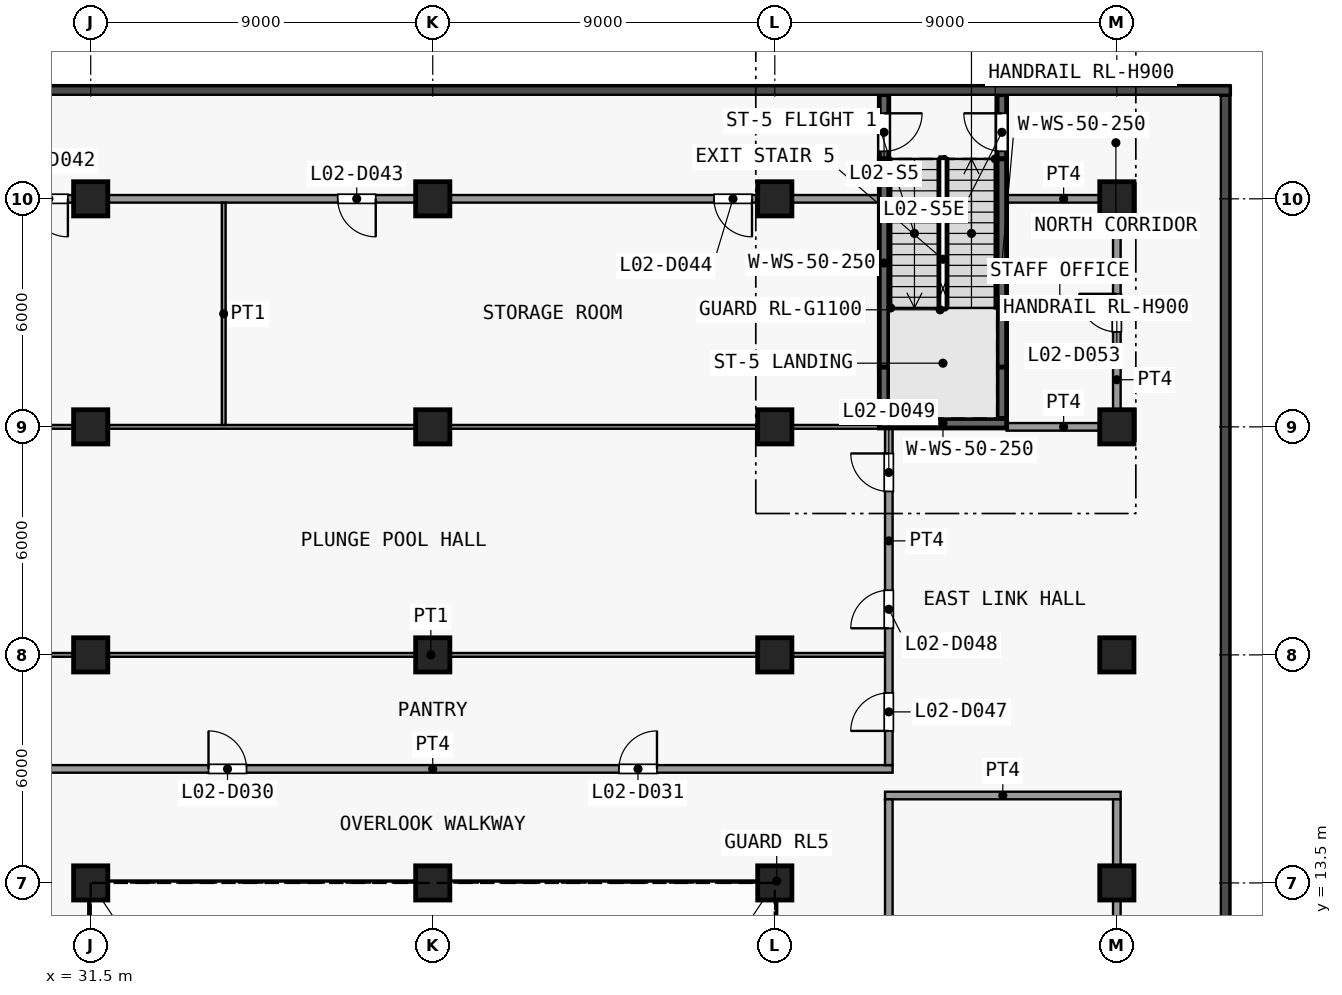
"""IFC4 building model, lengths in metres.
Left out: names, types, materials, properties, quantities, classifications, styles, units other than length and angle.
Written with IfcOpenShell. Run it as: python <this file> out.ifc"""

import sys

from ifc_helpers import new_model, si_unit, direction, frame, frame_2d, origin, origin_2d, place, context, subcontext, project, spatial, rectangle, extrude, element, fill, save


model = new_model("IFC4")
c1 = context("Model", 3, precision=1e-05, world=origin(), true_north=direction((0.0, 1.0)))
c2 = subcontext(c1, "Body", "Model", "MODEL_VIEW")
j1 = project(units=[si_unit("LENGTHUNIT", "METRE"), si_unit("PLANEANGLEUNIT", "RADIAN")], contexts=[c1])
p1 = place(None, origin())
s1 = spatial("IfcSite", under=j1, at=p1, CompositionType="ELEMENT")
p2 = place(p1, origin())
s2 = spatial("IfcBuilding", under=s1, at=p2, CompositionType="ELEMENT")
p3 = place(p2, frame((0.0, 0.0, 13.5)))
s3 = spatial("IfcBuildingStorey", under=s2, at=p3, CompositionType="ELEMENT", Elevation=13.5)
for number, where, z_axis, x_axis in (
    (1, (31.5, 13.5, 0.0), (0.0, 0.0, 1.0), (1.0, 0.0, 0.0)),
    (2, (31.5, 19.5, 0.0), (0.0, 0.0, 1.0), (1.0, 0.0, 0.0)),
    (3, (31.5, 25.5, 0.0), (0.0, 0.0, 1.0), (1.0, 0.0, 0.0)),
    (4, (31.5, 31.5, 0.0), (0.0, 0.0, 1.0), (1.0, 0.0, 0.0)),
    (5, (40.5, 13.5, 0.0), (0.0, 0.0, 1.0), (1.0, 0.0, 0.0)),
    (6, (40.5, 19.5, 0.0), (0.0, 0.0, 1.0), (1.0, 0.0, 0.0)),
    (7, (40.5, 25.5, 0.0), (0.0, 0.0, 1.0), (1.0, 0.0, 0.0)),
    (8, (40.5, 31.5, 0.0), (0.0, 0.0, 1.0), (1.0, 0.0, 0.0)),
    (9, (49.5, 13.5, 0.0), (0.0, 0.0, 1.0), (1.0, 0.0, 0.0)),
    (10, (49.5, 19.5, 0.0), (0.0, 0.0, 1.0), (1.0, 0.0, 0.0)),
    (11, (49.5, 25.5, 0.0), (0.0, 0.0, 1.0), (1.0, 0.0, 0.0)),
    (12, (49.5, 31.5, 0.0), (0.0, 0.0, 1.0), (1.0, 0.0, 0.0)),
    (13, (58.5, 13.5, 0.0), (0.0, 0.0, 1.0), (1.0, 0.0, 0.0)),
    (14, (58.5, 19.5, 0.0), (0.0, 0.0, 1.0), (1.0, 0.0, 0.0)),
    (15, (58.5, 25.5, 0.0), (0.0, 0.0, 1.0), (1.0, 0.0, 0.0)),
    (16, (58.5, 31.5, 0.0), (0.0, 0.0, 1.0), (1.0, 0.0, 0.0)),
):
    element("IfcColumn", number, at=place(p3, frame(where, z_axis=z_axis, x_axis=x_axis)), inside=s3, PredefinedType="COLUMN", context=c2, shape_type="SweptSolid", body=[
        extrude(rectangle(XDim=0.9, YDim=0.9, at=origin_2d()), origin(), (0.0, 0.0, 1.0), 5.0),
    ])
p4 = place(p3, frame((52.375, 34.24, 0.0), z_axis=(0.0, 0.0, 1.0), x_axis=(0.0, -1.0, 0.0)))
e17 = element("IfcWall", 17, at=p4, inside=s3, PredefinedType="SHEAR", context=c2, shape_type="SweptSolid", body=[
    extrude(rectangle(XDim=1.69, YDim=0.25, at=frame_2d((0.845, 0.0))), origin(), (0.0, 0.0, 1.0), 4.65),
])
p5 = place(p4, frame((0.49, 0.0, 0.0)))
e18 = element("IfcOpeningElement", 18, at=p5, cuts=e17, PredefinedType="OPENING", context=c2, shape_type="SweptSolid", body=[
    extrude(rectangle(XDim=1.0, YDim=2.1, at=frame_2d((0.5, 1.05))), frame((0.0, 0.135, 0.0), z_axis=(0.0, -1.0, 0.0), x_axis=(1.0, 0.0, 0.0)), (0.0, 0.0, 1.0), 0.27),
])
p6 = place(p3, frame((52.375, 27.07, 0.0), z_axis=(0.0, 0.0, 1.0), x_axis=(0.0, 1.0, 0.0)))
e19 = element("IfcWall", 19, at=p6, inside=s3, PredefinedType="SHEAR", context=c2, shape_type="SweptSolid", body=[
    extrude(rectangle(XDim=5.48, YDim=0.25, at=frame_2d((2.74, 0.0))), origin(), (0.0, 0.0, 1.0), 4.65),
])
p7 = place(p3, frame((52.375, 25.72, 0.0), z_axis=(0.0, 0.0, 1.0), x_axis=(0.0, 1.0, 0.0)))
e20 = element("IfcWall", 20, at=p7, inside=s3, PredefinedType="SHEAR", context=c2, shape_type="SweptSolid", body=[
    extrude(rectangle(XDim=1.35, YDim=0.25, at=frame_2d((0.675, 0.0))), origin(), (0.0, 0.0, 1.0), 4.65),
])
p8 = place(p3, frame((55.475, 32.55, 0.0), z_axis=(0.0, 0.0, 1.0), x_axis=(0.0, 1.0, 0.0)))
e21 = element("IfcWall", 21, at=p8, inside=s3, PredefinedType="SHEAR", context=c2, shape_type="SweptSolid", body=[
    extrude(rectangle(XDim=1.69, YDim=0.25, at=frame_2d((0.845, 0.0))), origin(), (0.0, 0.0, 1.0), 4.65),
])
p9 = place(p8, frame((0.2, 0.0, 0.0)))
e22 = element("IfcOpeningElement", 22, at=p9, cuts=e21, PredefinedType="OPENING", context=c2, shape_type="SweptSolid", body=[
    extrude(rectangle(XDim=1.0, YDim=2.1, at=frame_2d((0.5, 1.05))), frame((0.0, 0.135, 0.0), z_axis=(0.0, -1.0, 0.0), x_axis=(1.0, 0.0, 0.0)), (0.0, 0.0, 1.0), 0.27),
])
p10 = place(p3, frame((55.475, 27.07, 0.0), z_axis=(0.0, 0.0, 1.0), x_axis=(0.0, 1.0, 0.0)))
e23 = element("IfcWall", 23, at=p10, inside=s3, PredefinedType="SHEAR", context=c2, shape_type="SweptSolid", body=[
    extrude(rectangle(XDim=5.48, YDim=0.25, at=frame_2d((2.74, 0.0))), origin(), (0.0, 0.0, 1.0), 4.65),
])
p11 = place(p3, frame((55.475, 25.72, 0.0), z_axis=(0.0, 0.0, 1.0), x_axis=(0.0, 1.0, 0.0)))
e24 = element("IfcWall", 24, at=p11, inside=s3, PredefinedType="SHEAR", context=c2, shape_type="SweptSolid", body=[
    extrude(rectangle(XDim=1.35, YDim=0.25, at=frame_2d((0.675, 0.0))), origin(), (0.0, 0.0, 1.0), 4.65),
])
p12 = place(p3, frame((52.25, 25.595, 0.0), z_axis=(0.0, 0.0, 1.0), x_axis=(1.0, 0.0, 0.0)))
e25 = element("IfcWall", 25, at=p12, inside=s3, PredefinedType="SHEAR", context=c2, shape_type="SweptSolid", body=[
    extrude(rectangle(XDim=3.35, YDim=0.25, at=frame_2d((1.675, 0.0))), origin(), (0.0, 0.0, 1.0), 4.65),
])
p13 = place(p3, frame((52.4, 15.8, 0.0), z_axis=(0.0, 0.0, 1.0), x_axis=(1.0, 0.0, 0.0)))
e26 = element("IfcWall", 26, at=p13, inside=s3, PredefinedType="PARTITIONING", context=c2, shape_type="SweptSolid", body=[
    extrude(rectangle(XDim=6.2, YDim=0.2, at=frame_2d((3.1, 0.0))), origin(), (0.0, 0.0, 1.0), 4.65),
])
p14 = place(p3, frame((28.4, 16.5, 0.0), z_axis=(0.0, 0.0, 1.0), x_axis=(1.0, 0.0, 0.0)))
e27 = element("IfcWall", 27, at=p14, inside=s3, PredefinedType="PARTITIONING", context=c2, shape_type="SweptSolid", body=[
    extrude(rectangle(XDim=24.2, YDim=0.2, at=frame_2d((12.1, 0.0))), origin(), (0.0, 0.0, 1.0), 4.65),
])
p15 = place(p14, frame((6.2, 0.0, 0.0)))
e28 = element("IfcOpeningElement", 28, at=p15, cuts=e27, PredefinedType="OPENING", context=c2, shape_type="SweptSolid", body=[
    extrude(rectangle(XDim=1.0, YDim=2.1, at=frame_2d((0.5, 1.05))), frame((0.0, 0.11, 0.0), z_axis=(0.0, -1.0, 0.0), x_axis=(1.0, 0.0, 0.0)), (0.0, 0.0, 1.0), 0.22),
])
p16 = place(p14, frame((17.0, 0.0, 0.0)))
e29 = element("IfcOpeningElement", 29, at=p16, cuts=e27, PredefinedType="OPENING", context=c2, shape_type="SweptSolid", body=[
    extrude(rectangle(XDim=1.0, YDim=2.1, at=frame_2d((0.5, 1.05))), frame((0.0, 0.11, 0.0), z_axis=(0.0, -1.0, 0.0), x_axis=(1.0, 0.0, 0.0)), (0.0, 0.0, 1.0), 0.22),
])
p17 = place(p3, frame((28.5, 19.5, 0.0), z_axis=(0.0, 0.0, 1.0), x_axis=(1.0, 0.0, 0.0)))
e30 = element("IfcWall", 30, at=p17, inside=s3, PredefinedType="PARTITIONING", context=c2, shape_type="SweptSolid", body=[
    extrude(rectangle(XDim=23.9, YDim=0.1, at=frame_2d((11.95, 0.0))), origin(), (0.0, 0.0, 1.0), 4.65),
])
p18 = place(p3, frame((55.6, 25.5, 0.0), z_axis=(0.0, 0.0, 1.0), x_axis=(1.0, 0.0, 0.0)))
e31 = element("IfcWall", 31, at=p18, inside=s3, PredefinedType="PARTITIONING", context=c2, shape_type="SweptSolid", body=[
    extrude(rectangle(XDim=3.0, YDim=0.2, at=frame_2d((1.5, 0.0))), origin(), (0.0, 0.0, 1.0), 4.65),
])
p19 = place(p3, frame((-25.9, 25.5, 0.0), z_axis=(0.0, 0.0, 1.0), x_axis=(1.0, 0.0, 0.0)))
e32 = element("IfcWall", 32, at=p19, inside=s3, PredefinedType="PARTITIONING", context=c2, shape_type="SweptSolid", body=[
    extrude(rectangle(XDim=78.15, YDim=0.1, at=frame_2d((39.075, 0.0))), origin(), (0.0, 0.0, 1.0), 4.65),
])
p20 = place(p3, frame((-25.9, 31.5, 0.0), z_axis=(0.0, 0.0, 1.0), x_axis=(1.0, 0.0, 0.0)))
e33 = element("IfcWall", 33, at=p20, inside=s3, PredefinedType="PARTITIONING", context=c2, shape_type="SweptSolid", body=[
    extrude(rectangle(XDim=78.15, YDim=0.2, at=frame_2d((39.075, 0.0))), origin(), (0.0, 0.0, 1.0), 4.65),
])
p21 = place(p20, frame((4.0, 0.0, 0.0)))
e34 = element("IfcOpeningElement", 34, at=p21, cuts=e33, PredefinedType="OPENING", context=c2, shape_type="SweptSolid", body=[
    extrude(rectangle(XDim=1.0, YDim=2.1, at=frame_2d((0.5, 1.05))), frame((0.0, 0.11, 0.0), z_axis=(0.0, -1.0, 0.0), x_axis=(1.0, 0.0, 0.0)), (0.0, 0.0, 1.0), 0.22),
])
p22 = place(p20, frame((16.6, 0.0, 0.0)))
e35 = element("IfcOpeningElement", 35, at=p22, cuts=e33, PredefinedType="OPENING", context=c2, shape_type="SweptSolid", body=[
    extrude(rectangle(XDim=1.0, YDim=2.1, at=frame_2d((0.5, 1.05))), frame((0.0, 0.11, 0.0), z_axis=(0.0, -1.0, 0.0), x_axis=(1.0, 0.0, 0.0)), (0.0, 0.0, 1.0), 0.22),
])
p23 = place(p20, frame((24.4, 0.0, 0.0)))
e36 = element("IfcOpeningElement", 36, at=p23, cuts=e33, PredefinedType="OPENING", context=c2, shape_type="SweptSolid", body=[
    extrude(rectangle(XDim=1.0, YDim=2.1, at=frame_2d((0.5, 1.05))), frame((0.0, 0.11, 0.0), z_axis=(0.0, -1.0, 0.0), x_axis=(1.0, 0.0, 0.0)), (0.0, 0.0, 1.0), 0.22),
])
p24 = place(p20, frame((34.8, 0.0, 0.0)))
e37 = element("IfcOpeningElement", 37, at=p24, cuts=e33, PredefinedType="OPENING", context=c2, shape_type="SweptSolid", body=[
    extrude(rectangle(XDim=1.0, YDim=2.1, at=frame_2d((0.5, 1.05))), frame((0.0, 0.11, 0.0), z_axis=(0.0, -1.0, 0.0), x_axis=(1.0, 0.0, 0.0)), (0.0, 0.0, 1.0), 0.22),
])
p25 = place(p20, frame((43.0, 0.0, 0.0)))
e38 = element("IfcOpeningElement", 38, at=p25, cuts=e33, PredefinedType="OPENING", context=c2, shape_type="SweptSolid", body=[
    extrude(rectangle(XDim=1.0, YDim=2.1, at=frame_2d((0.5, 1.05))), frame((0.0, 0.11, 0.0), z_axis=(0.0, -1.0, 0.0), x_axis=(1.0, 0.0, 0.0)), (0.0, 0.0, 1.0), 0.22),
])
p26 = place(p20, frame((55.8, 0.0, 0.0)))
e39 = element("IfcOpeningElement", 39, at=p26, cuts=e33, PredefinedType="OPENING", context=c2, shape_type="SweptSolid", body=[
    extrude(rectangle(XDim=1.0, YDim=2.1, at=frame_2d((0.5, 1.05))), frame((0.0, 0.11, 0.0), z_axis=(0.0, -1.0, 0.0), x_axis=(1.0, 0.0, 0.0)), (0.0, 0.0, 1.0), 0.22),
])
p27 = place(p20, frame((63.9, 0.0, 0.0)))
e40 = element("IfcOpeningElement", 40, at=p27, cuts=e33, PredefinedType="OPENING", context=c2, shape_type="SweptSolid", body=[
    extrude(rectangle(XDim=1.0, YDim=2.1, at=frame_2d((0.5, 1.05))), frame((0.0, 0.11, 0.0), z_axis=(0.0, -1.0, 0.0), x_axis=(1.0, 0.0, 0.0)), (0.0, 0.0, 1.0), 0.22),
])
p28 = place(p20, frame((73.8, 0.0, 0.0)))
e41 = element("IfcOpeningElement", 41, at=p28, cuts=e33, PredefinedType="OPENING", context=c2, shape_type="SweptSolid", body=[
    extrude(rectangle(XDim=1.0, YDim=2.1, at=frame_2d((0.5, 1.05))), frame((0.0, 0.11, 0.0), z_axis=(0.0, -1.0, 0.0), x_axis=(1.0, 0.0, 0.0)), (0.0, 0.0, 1.0), 0.22),
])
p29 = place(p3, frame((55.6, 31.5, 0.0), z_axis=(0.0, 0.0, 1.0), x_axis=(1.0, 0.0, 0.0)))
e42 = element("IfcWall", 42, at=p29, inside=s3, PredefinedType="PARTITIONING", context=c2, shape_type="SweptSolid", body=[
    extrude(rectangle(XDim=3.0, YDim=0.2, at=frame_2d((1.5, 0.0))), origin(), (0.0, 0.0, 1.0), 4.65),
])
p30 = place(p3, frame((35.0, 25.55, 0.0), z_axis=(0.0, 0.0, 1.0), x_axis=(0.0, 1.0, 0.0)))
e43 = element("IfcWall", 43, at=p30, inside=s3, PredefinedType="PARTITIONING", context=c2, shape_type="SweptSolid", body=[
    extrude(rectangle(XDim=5.85, YDim=0.1, at=frame_2d((2.925, 0.0))), origin(), (0.0, 0.0, 1.0), 4.65),
])
p31 = place(p3, frame((52.5, -16.5, 0.0), z_axis=(0.0, 0.0, 1.0), x_axis=(0.0, 1.0, 0.0)))
e44 = element("IfcWall", 44, at=p31, inside=s3, PredefinedType="PARTITIONING", context=c2, shape_type="SweptSolid", body=[
    extrude(rectangle(XDim=32.2, YDim=0.2, at=frame_2d((16.1, 0.0))), origin(), (0.0, 0.0, 1.0), 4.65),
])
p32 = place(p3, frame((52.5, 16.6, 0.0), z_axis=(0.0, 0.0, 1.0), x_axis=(0.0, 1.0, 0.0)))
e45 = element("IfcWall", 45, at=p32, inside=s3, PredefinedType="PARTITIONING", context=c2, shape_type="SweptSolid", body=[
    extrude(rectangle(XDim=8.87, YDim=0.2, at=frame_2d((4.435, 0.0))), origin(), (0.0, 0.0, 1.0), 4.65),
])
p33 = place(p32, frame((0.9, 0.0, 0.0)))
e46 = element("IfcOpeningElement", 46, at=p33, cuts=e45, PredefinedType="OPENING", context=c2, shape_type="SweptSolid", body=[
    extrude(rectangle(XDim=1.0, YDim=2.1, at=frame_2d((0.5, 1.05))), frame((0.0, 0.11, 0.0), z_axis=(0.0, -1.0, 0.0), x_axis=(1.0, 0.0, 0.0)), (0.0, 0.0, 1.0), 0.22),
])
p34 = place(p32, frame((3.6, 0.0, 0.0)))
e47 = element("IfcOpeningElement", 47, at=p34, cuts=e45, PredefinedType="OPENING", context=c2, shape_type="SweptSolid", body=[
    extrude(rectangle(XDim=1.0, YDim=2.1, at=frame_2d((0.5, 1.05))), frame((0.0, 0.11, 0.0), z_axis=(0.0, -1.0, 0.0), x_axis=(1.0, 0.0, 0.0)), (0.0, 0.0, 1.0), 0.22),
])
p35 = place(p32, frame((7.2, 0.0, 0.0)))
e48 = element("IfcOpeningElement", 48, at=p35, cuts=e45, PredefinedType="OPENING", context=c2, shape_type="SweptSolid", body=[
    extrude(rectangle(XDim=1.0, YDim=2.1, at=frame_2d((0.5, 1.05))), frame((0.0, 0.11, 0.0), z_axis=(0.0, -1.0, 0.0), x_axis=(1.0, 0.0, 0.0)), (0.0, 0.0, 1.0), 0.22),
])
p36 = place(p3, frame((58.5, -31.4, 0.0), z_axis=(0.0, 0.0, 1.0), x_axis=(0.0, 1.0, 0.0)))
e49 = element("IfcWall", 49, at=p36, inside=s3, PredefinedType="PARTITIONING", context=c2, shape_type="SweptSolid", body=[
    extrude(rectangle(XDim=47.1, YDim=0.2, at=frame_2d((23.55, 0.0))), origin(), (0.0, 0.0, 1.0), 4.65),
])
p37 = place(p36, frame((7.3, 0.0, 0.0)))
e50 = element("IfcOpeningElement", 50, at=p37, cuts=e49, PredefinedType="OPENING", context=c2, shape_type="SweptSolid", body=[
    extrude(rectangle(XDim=1.0, YDim=2.1, at=frame_2d((0.5, 1.05))), frame((0.0, 0.11, 0.0), z_axis=(0.0, -1.0, 0.0), x_axis=(1.0, 0.0, 0.0)), (0.0, 0.0, 1.0), 0.22),
])
p38 = place(p36, frame((23.067, 0.0, 0.0)))
e51 = element("IfcOpeningElement", 51, at=p38, cuts=e49, PredefinedType="OPENING", context=c2, shape_type="SweptSolid", body=[
    extrude(rectangle(XDim=1.0, YDim=2.1, at=frame_2d((0.5, 1.05))), frame((0.0, 0.11, 0.0), z_axis=(0.0, -1.0, 0.0), x_axis=(1.0, 0.0, 0.0)), (0.0, 0.0, 1.0), 0.22),
])
p39 = place(p36, frame((39.433, 0.0, 0.0)))
e52 = element("IfcOpeningElement", 52, at=p39, cuts=e49, PredefinedType="OPENING", context=c2, shape_type="SweptSolid", body=[
    extrude(rectangle(XDim=1.0, YDim=2.1, at=frame_2d((0.5, 1.05))), frame((0.0, 0.11, 0.0), z_axis=(0.0, -1.0, 0.0), x_axis=(1.0, 0.0, 0.0)), (0.0, 0.0, 1.0), 0.22),
])
p40 = place(p3, frame((58.5, 25.6, 0.0), z_axis=(0.0, 0.0, 1.0), x_axis=(0.0, 1.0, 0.0)))
e53 = element("IfcWall", 53, at=p40, inside=s3, PredefinedType="PARTITIONING", context=c2, shape_type="SweptSolid", body=[
    extrude(rectangle(XDim=5.8, YDim=0.2, at=frame_2d((2.9, 0.0))), origin(), (0.0, 0.0, 1.0), 4.65),
])
p41 = place(p40, frame((2.4, 0.0, 0.0)))
e54 = element("IfcOpeningElement", 54, at=p41, cuts=e53, PredefinedType="OPENING", context=c2, shape_type="SweptSolid", body=[
    extrude(rectangle(XDim=1.0, YDim=2.1, at=frame_2d((0.5, 1.05))), frame((0.0, 0.11, 0.0), z_axis=(0.0, -1.0, 0.0), x_axis=(1.0, 0.0, 0.0)), (0.0, 0.0, 1.0), 0.22),
])
p42 = place(p5, origin())
e55 = element("IfcDoor", 55, at=p42, inside=s3, OperationType="SINGLE_SWING_LEFT", PredefinedType="DOOR", context=c2, shape_type="SweptSolid", body=[
    extrude(rectangle(XDim=1.0, YDim=2.1, at=frame_2d((0.5, 1.05))), frame((0.0, 0.025, 0.0), z_axis=(0.0, -1.0, 0.0), x_axis=(1.0, 0.0, 0.0)), (0.0, 0.0, 1.0), 0.05),
])
fill(e18, e55)
p43 = place(p9, origin())
e56 = element("IfcDoor", 56, at=p43, inside=s3, OperationType="SINGLE_SWING_RIGHT", PredefinedType="DOOR", context=c2, shape_type="SweptSolid", body=[
    extrude(rectangle(XDim=1.0, YDim=2.1, at=frame_2d((0.5, 1.05))), frame((0.0, 0.025, 0.0), z_axis=(0.0, -1.0, 0.0), x_axis=(1.0, 0.0, 0.0)), (0.0, 0.0, 1.0), 0.05),
])
fill(e22, e56)
p44 = place(p15, origin())
e57 = element("IfcDoor", 57, at=p44, inside=s3, OperationType="SINGLE_SWING_RIGHT", PredefinedType="DOOR", context=c2, shape_type="SweptSolid", body=[
    extrude(rectangle(XDim=1.0, YDim=2.1, at=frame_2d((0.5, 1.05))), frame((0.0, 0.025, 0.0), z_axis=(0.0, -1.0, 0.0), x_axis=(1.0, 0.0, 0.0)), (0.0, 0.0, 1.0), 0.05),
])
fill(e28, e57)
p45 = place(p16, origin())
e58 = element("IfcDoor", 58, at=p45, inside=s3, OperationType="SINGLE_SWING_LEFT", PredefinedType="DOOR", context=c2, shape_type="SweptSolid", body=[
    extrude(rectangle(XDim=1.0, YDim=2.1, at=frame_2d((0.5, 1.05))), frame((0.0, 0.025, 0.0), z_axis=(0.0, -1.0, 0.0), x_axis=(1.0, 0.0, 0.0)), (0.0, 0.0, 1.0), 0.05),
])
fill(e29, e58)
p46 = place(p26, origin())
e59 = element("IfcDoor", 59, at=p46, inside=s3, OperationType="SINGLE_SWING_RIGHT", PredefinedType="DOOR", context=c2, shape_type="SweptSolid", body=[
    extrude(rectangle(XDim=1.0, YDim=2.1, at=frame_2d((0.5, 1.05))), frame((0.0, 0.025, 0.0), z_axis=(0.0, -1.0, 0.0), x_axis=(1.0, 0.0, 0.0)), (0.0, 0.0, 1.0), 0.05),
])
fill(e39, e59)
p47 = place(p27, origin())
e60 = element("IfcDoor", 60, at=p47, inside=s3, OperationType="SINGLE_SWING_RIGHT", PredefinedType="DOOR", context=c2, shape_type="SweptSolid", body=[
    extrude(rectangle(XDim=1.0, YDim=2.1, at=frame_2d((0.5, 1.05))), frame((0.0, 0.025, 0.0), z_axis=(0.0, -1.0, 0.0), x_axis=(1.0, 0.0, 0.0)), (0.0, 0.0, 1.0), 0.05),
])
fill(e40, e60)
p48 = place(p28, origin())
e61 = element("IfcDoor", 61, at=p48, inside=s3, OperationType="SINGLE_SWING_RIGHT", PredefinedType="DOOR", context=c2, shape_type="SweptSolid", body=[
    extrude(rectangle(XDim=1.0, YDim=2.1, at=frame_2d((0.5, 1.05))), frame((0.0, 0.025, 0.0), z_axis=(0.0, -1.0, 0.0), x_axis=(1.0, 0.0, 0.0)), (0.0, 0.0, 1.0), 0.05),
])
fill(e41, e61)
p49 = place(p33, origin())
e62 = element("IfcDoor", 62, at=p49, inside=s3, OperationType="SINGLE_SWING_RIGHT", PredefinedType="DOOR", context=c2, shape_type="SweptSolid", body=[
    extrude(rectangle(XDim=1.0, YDim=2.1, at=frame_2d((0.5, 1.05))), frame((0.0, 0.025, 0.0), z_axis=(0.0, -1.0, 0.0), x_axis=(1.0, 0.0, 0.0)), (0.0, 0.0, 1.0), 0.05),
])
fill(e46, e62)
p50 = place(p34, origin())
e63 = element("IfcDoor", 63, at=p50, inside=s3, OperationType="SINGLE_SWING_RIGHT", PredefinedType="DOOR", context=c2, shape_type="SweptSolid", body=[
    extrude(rectangle(XDim=1.0, YDim=2.1, at=frame_2d((0.5, 1.05))), frame((0.0, 0.025, 0.0), z_axis=(0.0, -1.0, 0.0), x_axis=(1.0, 0.0, 0.0)), (0.0, 0.0, 1.0), 0.05),
])
fill(e47, e63)
p51 = place(p35, origin())
e64 = element("IfcDoor", 64, at=p51, inside=s3, OperationType="SINGLE_SWING_LEFT", PredefinedType="DOOR", context=c2, shape_type="SweptSolid", body=[
    extrude(rectangle(XDim=1.0, YDim=2.1, at=frame_2d((0.5, 1.05))), frame((0.0, 0.025, 0.0), z_axis=(0.0, -1.0, 0.0), x_axis=(1.0, 0.0, 0.0)), (0.0, 0.0, 1.0), 0.05),
])
fill(e48, e64)
p52 = place(p41, origin())
e65 = element("IfcDoor", 65, at=p52, inside=s3, OperationType="SINGLE_SWING_LEFT", PredefinedType="DOOR", context=c2, shape_type="SweptSolid", body=[
    extrude(rectangle(XDim=1.0, YDim=2.1, at=frame_2d((0.5, 1.05))), frame((0.0, 0.025, 0.0), z_axis=(0.0, -1.0, 0.0), x_axis=(1.0, 0.0, 0.0)), (0.0, 0.0, 1.0), 0.05),
])
fill(e54, e65)
save(model, sys.argv[1])
